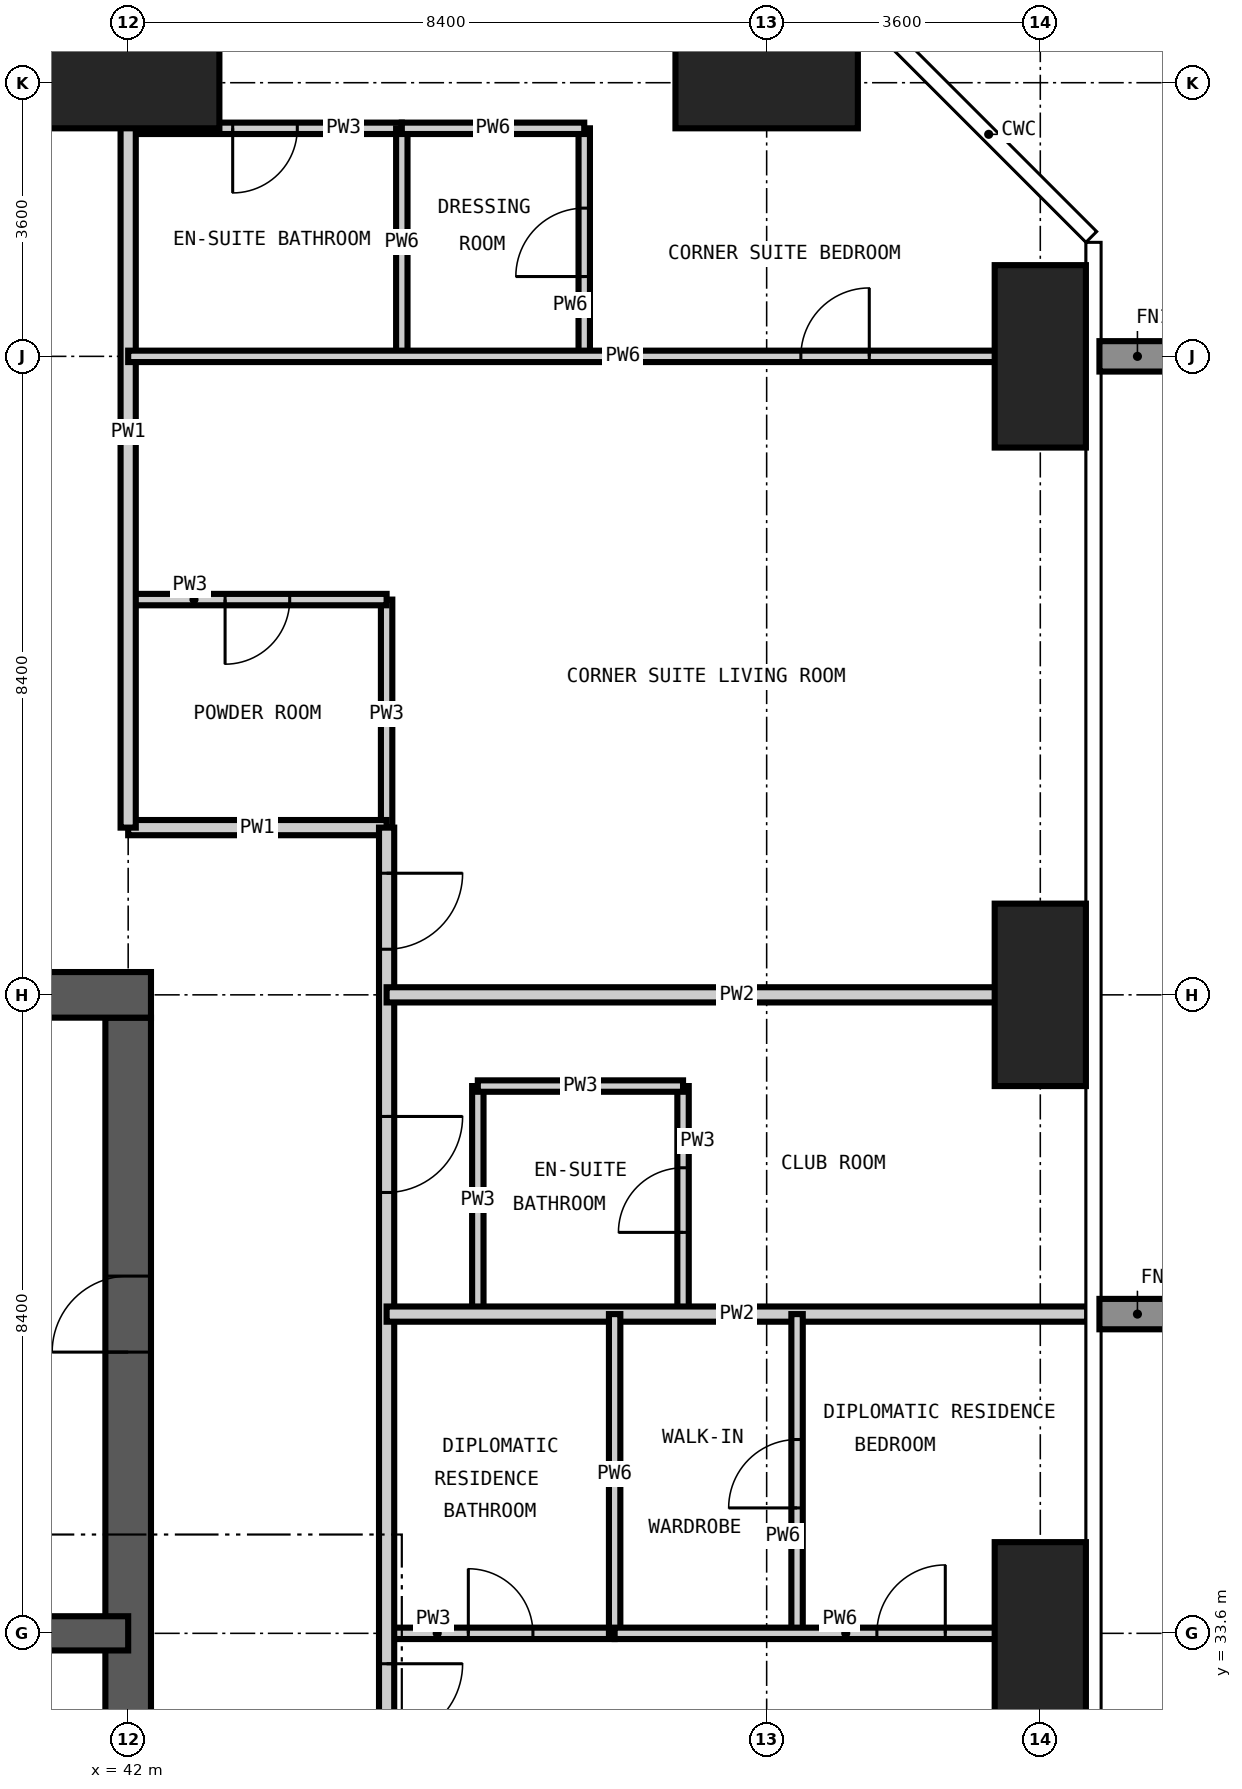
"""IFC4 building model, lengths in metres.
Left out: names, types, materials, properties, quantities, classifications, styles, units other than length and angle.
Written with IfcOpenShell. Run it as: python <this file> out.ifc"""

import sys

from ifc_helpers import new_model, si_unit, direction, frame, frame_2d, origin, origin_2d, place, context, subcontext, project, spatial, rectangle, extrude, element, fill, save


model = new_model("IFC4")
c1 = context("Model", 3, precision=1e-05, world=origin(), true_north=direction((0.0, 1.0)))
c2 = subcontext(c1, "Body", "Model", "MODEL_VIEW")
j1 = project(units=[si_unit("LENGTHUNIT", "METRE"), si_unit("PLANEANGLEUNIT", "RADIAN")], contexts=[c1])
p1 = place(None, origin())
s1 = spatial("IfcSite", under=j1, at=p1, CompositionType="ELEMENT")
p2 = place(p1, origin())
s2 = spatial("IfcBuilding", under=s1, at=p2, CompositionType="ELEMENT")
p3 = place(p2, frame((0.0, 0.0, 187.8)))
s3 = spatial("IfcBuildingStorey", under=s2, at=p3, CompositionType="ELEMENT", Elevation=187.8)
for number, where, z_axis, x_axis in (
    (1, (42.0, 54.0, -0.35), (0.0, 0.0, 1.0), (1.0, 0.0, 0.0)),
    (2, (50.4, 54.0, -0.35), (0.0, 0.0, 1.0), (1.0, 0.0, 0.0)),
):
    element("IfcColumn", number, at=place(p3, frame(where, z_axis=z_axis, x_axis=x_axis)), inside=s3, PredefinedType="COLUMN", context=c2, shape_type="SweptSolid", body=[
        extrude(rectangle(XDim=2.4, YDim=1.2, at=origin_2d()), origin(), (0.0, 0.0, 1.0), 3.6),
    ])
for number, where, z_axis, x_axis in (
    (3, (54.0, 33.6, -0.35), (0.0, 0.0, 1.0), (1.0, 0.0, 0.0)),
    (4, (54.0, 42.0, -0.35), (0.0, 0.0, 1.0), (1.0, 0.0, 0.0)),
    (5, (54.0, 50.4, -0.35), (0.0, 0.0, 1.0), (1.0, 0.0, 0.0)),
):
    element("IfcColumn", number, at=place(p3, frame(where, z_axis=z_axis, x_axis=x_axis)), inside=s3, PredefinedType="COLUMN", context=c2, shape_type="SweptSolid", body=[
        extrude(rectangle(XDim=1.2, YDim=2.4, at=origin_2d()), origin(), (0.0, 0.0, 1.0), 3.6),
    ])
p4 = place(p3, frame((42.0, 17.1, -0.35), z_axis=(0.0, 0.0, 1.0), x_axis=(0.0, 1.0, 0.0)))
e6 = element("IfcWall", 6, at=p4, inside=s3, PredefinedType="SHEAR", context=c2, shape_type="SweptSolid", body=[
    extrude(rectangle(XDim=24.6, YDim=0.6, at=frame_2d((12.3, 0.0))), origin(), (0.0, 0.0, 1.0), 3.6),
])
p5 = place(p4, frame((0.5, 0.0, 0.35)))
e7 = element("IfcOpeningElement", 7, at=p5, cuts=e6, PredefinedType="OPENING", context=c2, shape_type="SweptSolid", body=[
    extrude(rectangle(XDim=1.2, YDim=2.2, at=frame_2d((0.6, 1.1))), frame((0.0, 0.31, 0.0), z_axis=(0.0, -1.0, 0.0), x_axis=(1.0, 0.0, 0.0)), (0.0, 0.0, 1.0), 0.62),
])
p6 = place(p4, frame((11.8, 0.0, 0.35)))
e8 = element("IfcOpeningElement", 8, at=p6, cuts=e6, PredefinedType="OPENING", context=c2, shape_type="SweptSolid", body=[
    extrude(rectangle(XDim=1.0, YDim=2.1, at=frame_2d((0.5, 1.05))), frame((0.0, 0.31, 0.0), z_axis=(0.0, -1.0, 0.0), x_axis=(1.0, 0.0, 0.0)), (0.0, 0.0, 1.0), 0.62),
])
p7 = place(p4, frame((20.2, 0.0, 0.35)))
e9 = element("IfcOpeningElement", 9, at=p7, cuts=e6, PredefinedType="OPENING", context=c2, shape_type="SweptSolid", body=[
    extrude(rectangle(XDim=1.0, YDim=2.1, at=frame_2d((0.5, 1.05))), frame((0.0, 0.31, 0.0), z_axis=(0.0, -1.0, 0.0), x_axis=(1.0, 0.0, 0.0)), (0.0, 0.0, 1.0), 0.62),
])
p8 = place(p3, frame((42.3, 42.0, -0.35), z_axis=(0.0, 0.0, 1.0), x_axis=(-1.0, 0.0, 0.0)))
e10 = element("IfcWall", 10, at=p8, inside=s3, PredefinedType="SHEAR", context=c2, shape_type="SweptSolid", body=[
    extrude(rectangle(XDim=25.8, YDim=0.6, at=frame_2d((12.9, 0.0))), origin(), (0.0, 0.0, 1.0), 3.6),
])
p9 = place(p8, frame((20.8, 0.0, 0.35)))
e11 = element("IfcOpeningElement", 11, at=p9, cuts=e10, PredefinedType="OPENING", context=c2, shape_type="SweptSolid", body=[
    extrude(rectangle(XDim=1.0, YDim=2.1, at=frame_2d((0.5, 1.05))), frame((0.0, 0.31, 0.0), z_axis=(0.0, -1.0, 0.0), x_axis=(1.0, 0.0, 0.0)), (0.0, 0.0, 1.0), 0.62),
])
p10 = place(p8, frame((10.2, 0.0, 0.35)))
e12 = element("IfcOpeningElement", 12, at=p10, cuts=e10, PredefinedType="OPENING", context=c2, shape_type="SweptSolid", body=[
    extrude(rectangle(XDim=1.2, YDim=2.2, at=frame_2d((0.6, 1.1))), frame((0.0, 0.31, 0.0), z_axis=(0.0, -1.0, 0.0), x_axis=(1.0, 0.0, 0.0)), (0.0, 0.0, 1.0), 0.62),
])
p11 = place(p3, frame((16.8, 33.6, -0.35), z_axis=(0.0, 0.0, 1.0), x_axis=(1.0, 0.0, 0.0)))
e13 = element("IfcWall", 13, at=p11, inside=s3, PredefinedType="SHEAR", context=c2, shape_type="SweptSolid", body=[
    extrude(rectangle(XDim=25.2, YDim=0.45, at=frame_2d((12.6, 0.0))), origin(), (0.0, 0.0, 1.0), 3.6),
])
for number, where, z_axis, x_axis in (
    (14, (45.4, 44.2, 0.0), (0.0, 0.0, 1.0), (0.0, 1.0, 0.0)),
    (15, (46.6, 37.8, 0.0), (0.0, 0.0, 1.0), (0.0, 1.0, 0.0)),
):
    element("IfcWall", number, at=place(p3, frame(where, z_axis=z_axis, x_axis=x_axis)), inside=s3, PredefinedType="PARTITIONING", context=c2, shape_type="SweptSolid", body=[
        extrude(rectangle(XDim=3.0, YDim=0.15, at=frame_2d((1.5, 0.0))), origin(), (0.0, 0.0, 1.0), 3.25),
    ])
p12 = place(p3, frame((49.3, 37.8, 0.0), z_axis=(0.0, 0.0, 1.0), x_axis=(0.0, 1.0, 0.0)))
e16 = element("IfcWall", 16, at=p12, inside=s3, PredefinedType="PARTITIONING", context=c2, shape_type="SweptSolid", body=[
    extrude(rectangle(XDim=3.0, YDim=0.15, at=frame_2d((1.5, 0.0))), origin(), (0.0, 0.0, 1.0), 3.25),
])
p13 = place(p12, frame((1.075, 0.0, 0.0)))
e17 = element("IfcOpeningElement", 17, at=p13, cuts=e16, PredefinedType="OPENING", context=c2, shape_type="SweptSolid", body=[
    extrude(rectangle(XDim=0.85, YDim=2.1, at=frame_2d((0.425, 1.05))), frame((0.0, 0.085, 0.0), z_axis=(0.0, -1.0, 0.0), x_axis=(1.0, 0.0, 0.0)), (0.0, 0.0, 1.0), 0.17),
])
p14 = place(p3, frame((45.4, 33.6, 0.0), z_axis=(0.0, 0.0, 1.0), x_axis=(1.0, 0.0, 0.0)))
e18 = element("IfcWall", 18, at=p14, inside=s3, PredefinedType="PARTITIONING", context=c2, shape_type="SweptSolid", body=[
    extrude(rectangle(XDim=3.0, YDim=0.15, at=frame_2d((1.5, 0.0))), origin(), (0.0, 0.0, 1.0), 3.25),
])
p15 = place(p14, frame((1.075, 0.0, 0.0)))
e19 = element("IfcOpeningElement", 19, at=p15, cuts=e18, PredefinedType="OPENING", context=c2, shape_type="SweptSolid", body=[
    extrude(rectangle(XDim=0.85, YDim=2.1, at=frame_2d((0.425, 1.05))), frame((0.0, 0.085, 0.0), z_axis=(0.0, -1.0, 0.0), x_axis=(1.0, 0.0, 0.0)), (0.0, 0.0, 1.0), 0.17),
])
p16 = place(p3, frame((46.6, 40.8, 0.0), z_axis=(0.0, 0.0, 1.0), x_axis=(1.0, 0.0, 0.0)))
e20 = element("IfcWall", 20, at=p16, inside=s3, PredefinedType="PARTITIONING", context=c2, shape_type="SweptSolid", body=[
    extrude(rectangle(XDim=2.7, YDim=0.15, at=frame_2d((1.35, 0.0))), origin(), (0.0, 0.0, 1.0), 3.25),
])
p17 = place(p3, frame((42.0, 47.2, 0.0), z_axis=(0.0, 0.0, 1.0), x_axis=(1.0, 0.0, 0.0)))
e21 = element("IfcWall", 21, at=p17, inside=s3, PredefinedType="PARTITIONING", context=c2, shape_type="SweptSolid", body=[
    extrude(rectangle(XDim=3.4, YDim=0.15, at=frame_2d((1.7, 0.0))), origin(), (0.0, 0.0, 1.0), 3.25),
])
p18 = place(p17, frame((1.275, 0.0, 0.0)))
e22 = element("IfcOpeningElement", 22, at=p18, cuts=e21, PredefinedType="OPENING", context=c2, shape_type="SweptSolid", body=[
    extrude(rectangle(XDim=0.85, YDim=2.1, at=frame_2d((0.425, 1.05))), frame((0.0, 0.085, 0.0), z_axis=(0.0, -1.0, 0.0), x_axis=(1.0, 0.0, 0.0)), (0.0, 0.0, 1.0), 0.17),
])
p19 = place(p3, frame((42.0, 53.4, 0.0), z_axis=(0.0, 0.0, 1.0), x_axis=(1.0, 0.0, 0.0)))
e23 = element("IfcWall", 23, at=p19, inside=s3, PredefinedType="PARTITIONING", context=c2, shape_type="SweptSolid", body=[
    extrude(rectangle(XDim=3.6, YDim=0.15, at=frame_2d((1.8, 0.0))), origin(), (0.0, 0.0, 1.0), 3.25),
])
p20 = place(p19, frame((1.375, 0.0, 0.0)))
e24 = element("IfcOpeningElement", 24, at=p20, cuts=e23, PredefinedType="OPENING", context=c2, shape_type="SweptSolid", body=[
    extrude(rectangle(XDim=0.85, YDim=2.1, at=frame_2d((0.425, 1.05))), frame((0.0, 0.085, 0.0), z_axis=(0.0, -1.0, 0.0), x_axis=(1.0, 0.0, 0.0)), (0.0, 0.0, 1.0), 0.17),
])
p21 = place(p3, frame((42.0, 44.2, 0.0), z_axis=(0.0, 0.0, 1.0), x_axis=(1.0, 0.0, 0.0)))
e25 = element("IfcWall", 25, at=p21, inside=s3, PredefinedType="PARTITIONING", context=c2, shape_type="SweptSolid", body=[
    extrude(rectangle(XDim=3.4, YDim=0.2, at=frame_2d((1.7, 0.0))), origin(), (0.0, 0.0, 1.0), 3.25),
])
p22 = place(p3, frame((42.0, 54.618, 0.0), z_axis=(0.0, 0.0, 1.0), x_axis=(0.0, -1.0, 0.0)))
e26 = element("IfcWall", 26, at=p22, inside=s3, PredefinedType="PARTITIONING", context=c2, shape_type="SweptSolid", body=[
    extrude(rectangle(XDim=10.418, YDim=0.2, at=frame_2d((5.209, 0.0))), origin(), (0.0, 0.0, 1.0), 3.25),
])
p23 = place(p3, frame((45.4, 44.2, 0.0), z_axis=(0.0, 0.0, 1.0), x_axis=(0.0, -1.0, 0.0)))
e27 = element("IfcWall", 27, at=p23, inside=s3, PredefinedType="PARTITIONING", context=c2, shape_type="SweptSolid", body=[
    extrude(rectangle(XDim=30.2, YDim=0.2, at=frame_2d((15.1, 0.0))), origin(), (0.0, 0.0, 1.0), 3.25),
])
p24 = place(p23, frame((21.8, 0.0, 0.0)))
e28 = element("IfcOpeningElement", 28, at=p24, cuts=e27, PredefinedType="OPENING", context=c2, shape_type="SweptSolid", body=[
    extrude(rectangle(XDim=1.0, YDim=2.2, at=frame_2d((0.5, 1.1))), frame((0.0, 0.11, 0.0), z_axis=(0.0, -1.0, 0.0), x_axis=(1.0, 0.0, 0.0)), (0.0, 0.0, 1.0), 0.22),
])
p25 = place(p23, frame((11.0, 0.0, 0.0)))
e29 = element("IfcOpeningElement", 29, at=p25, cuts=e27, PredefinedType="OPENING", context=c2, shape_type="SweptSolid", body=[
    extrude(rectangle(XDim=1.0, YDim=2.2, at=frame_2d((0.5, 1.1))), frame((0.0, 0.11, 0.0), z_axis=(0.0, -1.0, 0.0), x_axis=(1.0, 0.0, 0.0)), (0.0, 0.0, 1.0), 0.22),
])
p26 = place(p23, frame((3.8, 0.0, 0.0)))
e30 = element("IfcOpeningElement", 30, at=p26, cuts=e27, PredefinedType="OPENING", context=c2, shape_type="SweptSolid", body=[
    extrude(rectangle(XDim=1.0, YDim=2.2, at=frame_2d((0.5, 1.1))), frame((0.0, 0.11, 0.0), z_axis=(0.0, -1.0, 0.0), x_axis=(1.0, 0.0, 0.0)), (0.0, 0.0, 1.0), 0.22),
])
p27 = place(p23, frame((28.3, 0.0, 0.0)))
e31 = element("IfcOpeningElement", 31, at=p27, cuts=e27, PredefinedType="OPENING", context=c2, shape_type="SweptSolid", body=[
    extrude(rectangle(XDim=1.0, YDim=2.2, at=frame_2d((0.5, 1.1))), frame((0.0, 0.11, 0.0), z_axis=(0.0, -1.0, 0.0), x_axis=(1.0, 0.0, 0.0)), (0.0, 0.0, 1.0), 0.22),
])
p28 = place(p23, frame((0.6, 0.0, 0.0)))
e32 = element("IfcOpeningElement", 32, at=p28, cuts=e27, PredefinedType="OPENING", context=c2, shape_type="SweptSolid", body=[
    extrude(rectangle(XDim=1.0, YDim=2.2, at=frame_2d((0.5, 1.1))), frame((0.0, 0.11, 0.0), z_axis=(0.0, -1.0, 0.0), x_axis=(1.0, 0.0, 0.0)), (0.0, 0.0, 1.0), 0.22),
])
for number, where, z_axis, x_axis in (
    (33, (45.4, 37.8, 0.0), (0.0, 0.0, 1.0), (1.0, 0.0, 0.0)),
    (34, (45.4, 42.0, 0.0), (0.0, 0.0, 1.0), (1.0, 0.0, 0.0)),
):
    element("IfcWall", number, at=place(p3, frame(where, z_axis=z_axis, x_axis=x_axis)), inside=s3, PredefinedType="PARTITIONING", context=c2, shape_type="SweptSolid", body=[
        extrude(rectangle(XDim=9.218, YDim=0.2, at=frame_2d((4.609, 0.0))), origin(), (0.0, 0.0, 1.0), 3.25),
    ])
p29 = place(p3, frame((45.6, 50.4, 0.0), z_axis=(0.0, 0.0, 1.0), x_axis=(0.0, 1.0, 0.0)))
e35 = element("IfcWall", 35, at=p29, inside=s3, PredefinedType="PARTITIONING", context=c2, shape_type="SweptSolid", body=[
    extrude(rectangle(XDim=3.0, YDim=0.15, at=frame_2d((1.5, 0.0))), origin(), (0.0, 0.0, 1.0), 3.25),
])
p30 = place(p3, frame((48.0, 50.4, 0.0), z_axis=(0.0, 0.0, 1.0), x_axis=(0.0, 1.0, 0.0)))
e36 = element("IfcWall", 36, at=p30, inside=s3, PredefinedType="PARTITIONING", context=c2, shape_type="SweptSolid", body=[
    extrude(rectangle(XDim=3.0, YDim=0.15, at=frame_2d((1.5, 0.0))), origin(), (0.0, 0.0, 1.0), 3.25),
])
p31 = place(p30, frame((1.05, 0.0, 0.0)))
e37 = element("IfcOpeningElement", 37, at=p31, cuts=e36, PredefinedType="OPENING", context=c2, shape_type="SweptSolid", body=[
    extrude(rectangle(XDim=0.9, YDim=2.1, at=frame_2d((0.45, 1.05))), frame((0.0, 0.085, 0.0), z_axis=(0.0, -1.0, 0.0), x_axis=(1.0, 0.0, 0.0)), (0.0, 0.0, 1.0), 0.17),
])
p32 = place(p3, frame((48.4, 33.6, 0.0), z_axis=(0.0, 0.0, 1.0), x_axis=(0.0, 1.0, 0.0)))
e38 = element("IfcWall", 38, at=p32, inside=s3, PredefinedType="PARTITIONING", context=c2, shape_type="SweptSolid", body=[
    extrude(rectangle(XDim=4.2, YDim=0.15, at=frame_2d((2.1, 0.0))), origin(), (0.0, 0.0, 1.0), 3.25),
])
p33 = place(p3, frame((50.8, 33.6, 0.0), z_axis=(0.0, 0.0, 1.0), x_axis=(0.0, 1.0, 0.0)))
e39 = element("IfcWall", 39, at=p33, inside=s3, PredefinedType="PARTITIONING", context=c2, shape_type="SweptSolid", body=[
    extrude(rectangle(XDim=4.2, YDim=0.15, at=frame_2d((2.1, 0.0))), origin(), (0.0, 0.0, 1.0), 3.25),
])
p34 = place(p33, frame((1.65, 0.0, 0.0)))
e40 = element("IfcOpeningElement", 40, at=p34, cuts=e39, PredefinedType="OPENING", context=c2, shape_type="SweptSolid", body=[
    extrude(rectangle(XDim=0.9, YDim=2.1, at=frame_2d((0.45, 1.05))), frame((0.0, 0.085, 0.0), z_axis=(0.0, -1.0, 0.0), x_axis=(1.0, 0.0, 0.0)), (0.0, 0.0, 1.0), 0.17),
])
p35 = place(p3, frame((48.4, 33.6, 0.0), z_axis=(0.0, 0.0, 1.0), x_axis=(1.0, 0.0, 0.0)))
e41 = element("IfcWall", 41, at=p35, inside=s3, PredefinedType="PARTITIONING", context=c2, shape_type="SweptSolid", body=[
    extrude(rectangle(XDim=6.218, YDim=0.15, at=frame_2d((3.109, 0.0))), origin(), (0.0, 0.0, 1.0), 3.25),
])
p36 = place(p35, frame((3.45, 0.0, 0.0)))
e42 = element("IfcOpeningElement", 42, at=p36, cuts=e41, PredefinedType="OPENING", context=c2, shape_type="SweptSolid", body=[
    extrude(rectangle(XDim=0.9, YDim=2.1, at=frame_2d((0.45, 1.05))), frame((0.0, 0.085, 0.0), z_axis=(0.0, -1.0, 0.0), x_axis=(1.0, 0.0, 0.0)), (0.0, 0.0, 1.0), 0.17),
])
p37 = place(p3, frame((42.0, 50.4, 0.0), z_axis=(0.0, 0.0, 1.0), x_axis=(1.0, 0.0, 0.0)))
e43 = element("IfcWall", 43, at=p37, inside=s3, PredefinedType="PARTITIONING", context=c2, shape_type="SweptSolid", body=[
    extrude(rectangle(XDim=12.618, YDim=0.15, at=frame_2d((6.309, 0.0))), origin(), (0.0, 0.0, 1.0), 3.25),
])
p38 = place(p37, frame((8.85, 0.0, 0.0)))
e44 = element("IfcOpeningElement", 44, at=p38, cuts=e43, PredefinedType="OPENING", context=c2, shape_type="SweptSolid", body=[
    extrude(rectangle(XDim=0.9, YDim=2.1, at=frame_2d((0.45, 1.05))), frame((0.0, 0.085, 0.0), z_axis=(0.0, -1.0, 0.0), x_axis=(1.0, 0.0, 0.0)), (0.0, 0.0, 1.0), 0.17),
])
p39 = place(p3, frame((45.6, 53.4, 0.0), z_axis=(0.0, 0.0, 1.0), x_axis=(1.0, 0.0, 0.0)))
e45 = element("IfcWall", 45, at=p39, inside=s3, PredefinedType="PARTITIONING", context=c2, shape_type="SweptSolid", body=[
    extrude(rectangle(XDim=2.4, YDim=0.15, at=frame_2d((1.2, 0.0))), origin(), (0.0, 0.0, 1.0), 3.25),
])
p40 = place(p25, origin())
e46 = element("IfcDoor", 46, at=p40, inside=s3, OperationType="SINGLE_SWING_LEFT", PredefinedType="DOOR", context=c2, shape_type="SweptSolid", body=[
    extrude(rectangle(XDim=1.0, YDim=2.2, at=frame_2d((0.5, 1.1))), frame((0.0, 0.025, 0.0), z_axis=(0.0, -1.0, 0.0), x_axis=(1.0, 0.0, 0.0)), (0.0, 0.0, 1.0), 0.05),
])
fill(e29, e46)
p41 = place(p15, origin())
e47 = element("IfcDoor", 47, at=p41, inside=s3, OperationType="SINGLE_SWING_LEFT", PredefinedType="DOOR", context=c2, shape_type="SweptSolid", body=[
    extrude(rectangle(XDim=0.85, YDim=2.1, at=frame_2d((0.425, 1.05))), frame((0.0, 0.025, 0.0), z_axis=(0.0, -1.0, 0.0), x_axis=(1.0, 0.0, 0.0)), (0.0, 0.0, 1.0), 0.05),
])
fill(e19, e47)
p42 = place(p34, origin())
e48 = element("IfcDoor", 48, at=p42, inside=s3, OperationType="SINGLE_SWING_LEFT", PredefinedType="DOOR", context=c2, shape_type="SweptSolid", body=[
    extrude(rectangle(XDim=0.9, YDim=2.1, at=frame_2d((0.45, 1.05))), frame((0.0, 0.025, 0.0), z_axis=(0.0, -1.0, 0.0), x_axis=(1.0, 0.0, 0.0)), (0.0, 0.0, 1.0), 0.05),
])
fill(e40, e48)
p43 = place(p36, origin())
e49 = element("IfcDoor", 49, at=p43, inside=s3, OperationType="SINGLE_SWING_RIGHT", PredefinedType="DOOR", context=c2, shape_type="SweptSolid", body=[
    extrude(rectangle(XDim=0.9, YDim=2.1, at=frame_2d((0.45, 1.05))), frame((0.0, 0.025, 0.0), z_axis=(0.0, -1.0, 0.0), x_axis=(1.0, 0.0, 0.0)), (0.0, 0.0, 1.0), 0.05),
])
fill(e42, e49)
p44 = place(p26, origin())
e50 = element("IfcDoor", 50, at=p44, inside=s3, OperationType="SINGLE_SWING_LEFT", PredefinedType="DOOR", context=c2, shape_type="SweptSolid", body=[
    extrude(rectangle(XDim=1.0, YDim=2.2, at=frame_2d((0.5, 1.1))), frame((0.0, 0.025, 0.0), z_axis=(0.0, -1.0, 0.0), x_axis=(1.0, 0.0, 0.0)), (0.0, 0.0, 1.0), 0.05),
])
fill(e30, e50)
p45 = place(p13, origin())
e51 = element("IfcDoor", 51, at=p45, inside=s3, OperationType="SINGLE_SWING_LEFT", PredefinedType="DOOR", context=c2, shape_type="SweptSolid", body=[
    extrude(rectangle(XDim=0.85, YDim=2.1, at=frame_2d((0.425, 1.05))), frame((0.0, 0.025, 0.0), z_axis=(0.0, -1.0, 0.0), x_axis=(1.0, 0.0, 0.0)), (0.0, 0.0, 1.0), 0.05),
])
fill(e17, e51)
p46 = place(p28, origin())
e52 = element("IfcDoor", 52, at=p46, inside=s3, OperationType="SINGLE_SWING_LEFT", PredefinedType="DOOR", context=c2, shape_type="SweptSolid", body=[
    extrude(rectangle(XDim=1.0, YDim=2.2, at=frame_2d((0.5, 1.1))), frame((0.0, 0.025, 0.0), z_axis=(0.0, -1.0, 0.0), x_axis=(1.0, 0.0, 0.0)), (0.0, 0.0, 1.0), 0.05),
])
fill(e32, e52)
p47 = place(p18, frame((0.85, 0.0, 0.0), z_axis=(0.0, 0.0, 1.0), x_axis=(-1.0, 0.0, 0.0)))
e53 = element("IfcDoor", 53, at=p47, inside=s3, OperationType="SINGLE_SWING_RIGHT", PredefinedType="DOOR", context=c2, shape_type="SweptSolid", body=[
    extrude(rectangle(XDim=0.85, YDim=2.1, at=frame_2d((0.425, 1.05))), frame((0.0, 0.025, 0.0), z_axis=(0.0, -1.0, 0.0), x_axis=(1.0, 0.0, 0.0)), (0.0, 0.0, 1.0), 0.05),
])
fill(e22, e53)
p48 = place(p38, origin())
e54 = element("IfcDoor", 54, at=p48, inside=s3, OperationType="SINGLE_SWING_RIGHT", PredefinedType="DOOR", context=c2, shape_type="SweptSolid", body=[
    extrude(rectangle(XDim=0.9, YDim=2.1, at=frame_2d((0.45, 1.05))), frame((0.0, 0.025, 0.0), z_axis=(0.0, -1.0, 0.0), x_axis=(1.0, 0.0, 0.0)), (0.0, 0.0, 1.0), 0.05),
])
fill(e44, e54)
p49 = place(p20, frame((0.85, 0.0, 0.0), z_axis=(0.0, 0.0, 1.0), x_axis=(-1.0, 0.0, 0.0)))
e55 = element("IfcDoor", 55, at=p49, inside=s3, OperationType="SINGLE_SWING_RIGHT", PredefinedType="DOOR", context=c2, shape_type="SweptSolid", body=[
    extrude(rectangle(XDim=0.85, YDim=2.1, at=frame_2d((0.425, 1.05))), frame((0.0, 0.025, 0.0), z_axis=(0.0, -1.0, 0.0), x_axis=(1.0, 0.0, 0.0)), (0.0, 0.0, 1.0), 0.05),
])
fill(e24, e55)
p50 = place(p31, origin())
e56 = element("IfcDoor", 56, at=p50, inside=s3, OperationType="SINGLE_SWING_LEFT", PredefinedType="DOOR", context=c2, shape_type="SweptSolid", body=[
    extrude(rectangle(XDim=0.9, YDim=2.1, at=frame_2d((0.45, 1.05))), frame((0.0, 0.025, 0.0), z_axis=(0.0, -1.0, 0.0), x_axis=(1.0, 0.0, 0.0)), (0.0, 0.0, 1.0), 0.05),
])
fill(e37, e56)
p51 = place(p7, origin())
e57 = element("IfcDoor", 57, at=p51, inside=s3, OperationType="SINGLE_SWING_LEFT", PredefinedType="DOOR", context=c2, shape_type="SweptSolid", body=[
    extrude(rectangle(XDim=1.0, YDim=2.1, at=frame_2d((0.5, 1.05))), frame((0.0, 0.025, 0.0), z_axis=(0.0, -1.0, 0.0), x_axis=(1.0, 0.0, 0.0)), (0.0, 0.0, 1.0), 0.05),
])
fill(e9, e57)
save(model, sys.argv[1])
